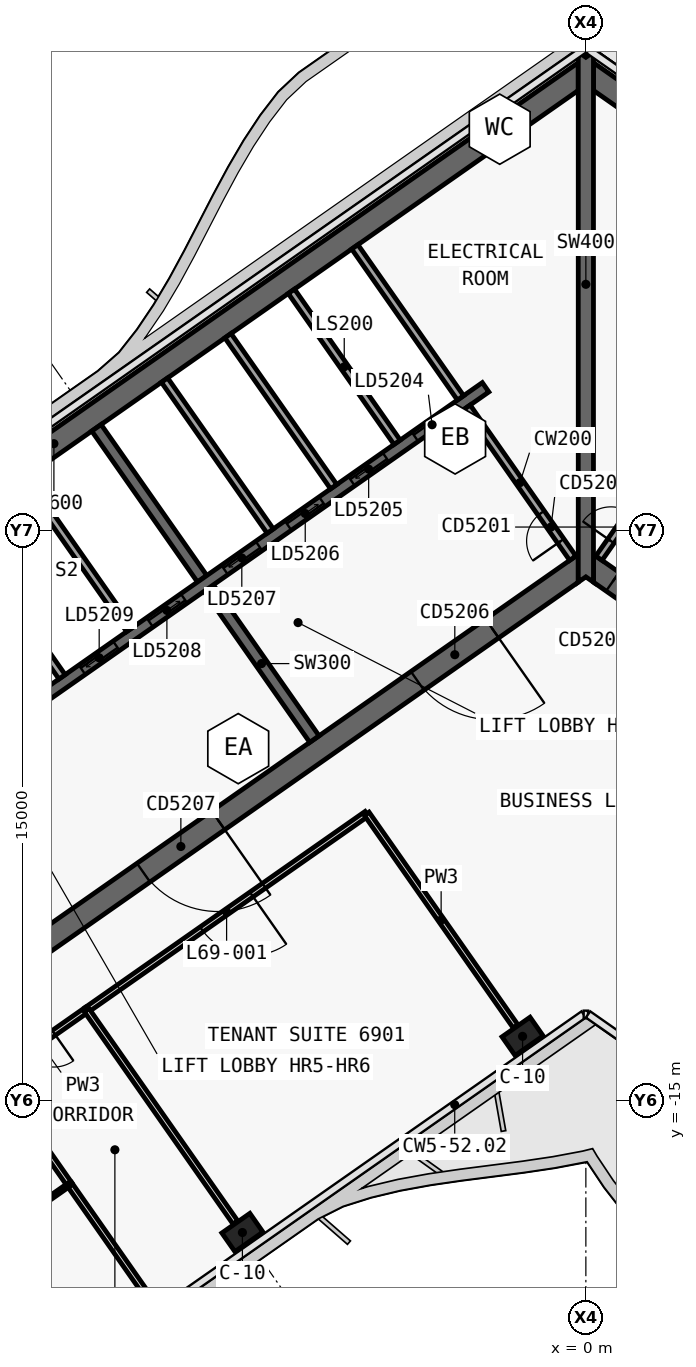
"""IFC4 building model, lengths in metres.
Left out: names, types, materials, properties, quantities, classifications, styles, units other than length and angle.
Written with IfcOpenShell. Run it as: python <this file> out.ifc"""

import sys

from ifc_helpers import new_model, si_unit, direction, frame, frame_2d, origin, origin_2d, place, context, subcontext, project, spatial, polyline, rectangle, outline, extrude, element, fill, save


model = new_model("IFC4")
c1 = context("Model", 3, precision=1e-05, world=origin(), true_north=direction((0.0, 1.0)))
c2 = subcontext(c1, "Body", "Model", "MODEL_VIEW")
j1 = project(units=[si_unit("LENGTHUNIT", "METRE"), si_unit("PLANEANGLEUNIT", "RADIAN")], contexts=[c1])
p1 = place(None, origin())
s1 = spatial("IfcSite", under=j1, at=p1, CompositionType="ELEMENT")
p2 = place(p1, origin())
s2 = spatial("IfcBuilding", under=s1, at=p2, CompositionType="ELEMENT")
p3 = place(p2, frame((0.0, 0.0, 291.7)))
s3 = spatial("IfcBuildingStorey", under=s2, at=p3, CompositionType="ELEMENT", Elevation=291.7)
p4 = place(p3, frame((-0.028, 12.066, 0.0), z_axis=(0.0, 0.0, 1.0), x_axis=(-0.819151382952, -0.573577380837, 0.0)))
e1 = element("IfcWall", 1, at=p4, inside=s3, PredefinedType="SHEAR", context=c2, shape_type="SweptSolid", body=[
    extrude(outline(polyline([(33.898, 0.3), (0.42, 0.3), (0.0, -0.3), (33.898, -0.3), (33.898, 0.3)])), origin(), (0.0, 0.0, 1.0), 3.9),
])
p5 = place(p3, frame((-0.028, -0.874, 0.0), z_axis=(0.0, 0.0, 1.0), x_axis=(-0.819150035022, -0.573579305871, 0.0)))
e2 = element("IfcWall", 2, at=p5, inside=s3, PredefinedType="SHEAR", context=c2, shape_type="SweptSolid", body=[
    extrude(outline(polyline([(26.476, 0.3), (0.42, 0.3), (0.0, -0.3), (26.476, -0.3), (26.476, 0.3)])), origin(), (0.0, 0.0, 1.0), 3.9),
])
p6 = place(p5, frame((2.976, 0.0, 0.0)))
e3 = element("IfcOpeningElement", 3, at=p6, cuts=e2, PredefinedType="OPENING", context=c2, shape_type="SweptSolid", body=[
    extrude(rectangle(XDim=2.4, YDim=2.1, at=frame_2d((1.2, 1.05))), frame((0.0, 0.31, 0.0), z_axis=(0.0, -1.0, 0.0), x_axis=(1.0, 0.0, 0.0)), (0.0, 0.0, 1.0), 0.62),
])
p7 = place(p5, frame((11.776, 0.0, 0.0)))
e4 = element("IfcOpeningElement", 4, at=p7, cuts=e2, PredefinedType="OPENING", context=c2, shape_type="SweptSolid", body=[
    extrude(rectangle(XDim=2.4, YDim=2.1, at=frame_2d((1.2, 1.05))), frame((0.0, 0.31, 0.0), z_axis=(0.0, -1.0, 0.0), x_axis=(1.0, 0.0, 0.0)), (0.0, 0.0, 1.0), 0.62),
])
p8 = place(p3, frame((-7.143, -5.49, 0.0), z_axis=(0.0, 0.0, 1.0), x_axis=(-0.573617744349, 0.819123118565, 0.0)))
e5 = element("IfcWall", 5, at=p8, inside=s3, PredefinedType="SHEAR", context=c2, shape_type="SweptSolid", body=[
    extrude(outline(polyline([(4.85, 0.15), (0.0, 0.15), (0.0, -0.15), (4.85, -0.15), (4.85, 0.15)])), origin(), (0.0, 0.0, 1.0), 3.9),
])
p9 = place(p3, frame((-10.097, -1.271, 0.0), z_axis=(0.0, 0.0, 1.0), x_axis=(-0.573560315113, 0.819163332265, 0.0)))
e6 = element("IfcWall", 6, at=p9, inside=s3, PredefinedType="SHEAR", context=c2, shape_type="SweptSolid", body=[
    extrude(outline(polyline([(4.85, -0.15), (4.85, 0.15), (0.0, 0.15), (0.0, -0.15), (4.85, -0.15)])), origin(), (0.0, 0.0, 1.0), 3.9),
])
p10 = place(p3, frame((-2.638, 3.768, 0.0), z_axis=(0.0, 0.0, 1.0), x_axis=(-0.819155014212, -0.573572194837, 0.0)))
e7 = element("IfcWall", 7, at=p10, inside=s3, PredefinedType="SHEAR", context=c2, shape_type="SweptSolid", body=[
    extrude(outline(polyline([(26.4, 0.15), (0.0, 0.15), (0.0, -0.15), (26.4, -0.15), (26.4, 0.15)])), origin(), (0.0, 0.0, 1.0), 3.9),
])
p11 = place(p10, frame((1.169, 0.0, 0.0)))
e8 = element("IfcOpeningElement", 8, at=p11, cuts=e7, PredefinedType="OPENING", context=c2, shape_type="SweptSolid", body=[
    extrude(rectangle(XDim=1.1, YDim=2.1, at=frame_2d((0.55, 1.05))), frame((0.0, 0.16, 0.0), z_axis=(0.0, -1.0, 0.0), x_axis=(1.0, 0.0, 0.0)), (0.0, 0.0, 1.0), 0.32),
])
p12 = place(p10, frame((3.206, 0.0, 0.0)))
e9 = element("IfcOpeningElement", 9, at=p12, cuts=e7, PredefinedType="OPENING", context=c2, shape_type="SweptSolid", body=[
    extrude(rectangle(XDim=1.1, YDim=2.1, at=frame_2d((0.55, 1.05))), frame((0.0, 0.16, 0.0), z_axis=(0.0, -1.0, 0.0), x_axis=(1.0, 0.0, 0.0)), (0.0, 0.0, 1.0), 0.32),
])
p13 = place(p10, frame((5.244, 0.0, 0.0)))
e10 = element("IfcOpeningElement", 10, at=p13, cuts=e7, PredefinedType="OPENING", context=c2, shape_type="SweptSolid", body=[
    extrude(rectangle(XDim=1.1, YDim=2.1, at=frame_2d((0.55, 1.05))), frame((0.0, 0.16, 0.0), z_axis=(0.0, -1.0, 0.0), x_axis=(1.0, 0.0, 0.0)), (0.0, 0.0, 1.0), 0.32),
])
p14 = place(p10, frame((7.281, 0.0, 0.0)))
e11 = element("IfcOpeningElement", 11, at=p14, cuts=e7, PredefinedType="OPENING", context=c2, shape_type="SweptSolid", body=[
    extrude(rectangle(XDim=1.1, YDim=2.1, at=frame_2d((0.55, 1.05))), frame((0.0, 0.16, 0.0), z_axis=(0.0, -1.0, 0.0), x_axis=(1.0, 0.0, 0.0)), (0.0, 0.0, 1.0), 0.32),
])
p15 = place(p10, frame((9.688, 0.0, 0.0)))
e12 = element("IfcOpeningElement", 12, at=p15, cuts=e7, PredefinedType="OPENING", context=c2, shape_type="SweptSolid", body=[
    extrude(rectangle(XDim=1.1, YDim=2.1, at=frame_2d((0.55, 1.05))), frame((0.0, 0.16, 0.0), z_axis=(0.0, -1.0, 0.0), x_axis=(1.0, 0.0, 0.0)), (0.0, 0.0, 1.0), 0.32),
])
p16 = place(p10, frame((11.863, 0.0, 0.0)))
e13 = element("IfcOpeningElement", 13, at=p16, cuts=e7, PredefinedType="OPENING", context=c2, shape_type="SweptSolid", body=[
    extrude(rectangle(XDim=1.1, YDim=2.1, at=frame_2d((0.55, 1.05))), frame((0.0, 0.16, 0.0), z_axis=(0.0, -1.0, 0.0), x_axis=(1.0, 0.0, 0.0)), (0.0, 0.0, 1.0), 0.32),
])
p17 = place(p10, frame((15.175, 0.0, 0.0)))
e14 = element("IfcOpeningElement", 14, at=p17, cuts=e7, PredefinedType="OPENING", context=c2, shape_type="SweptSolid", body=[
    extrude(rectangle(XDim=1.0, YDim=2.1, at=frame_2d((0.5, 1.05))), frame((0.0, 0.16, 0.0), z_axis=(0.0, -1.0, 0.0), x_axis=(1.0, 0.0, 0.0)), (0.0, 0.0, 1.0), 0.32),
])
p18 = place(p3, frame((0.028, 12.066, 0.0), z_axis=(0.0, 0.0, 1.0), x_axis=(0.819151382952, -0.573577380837, 0.0)))
e15 = element("IfcWall", 15, at=p18, inside=s3, PredefinedType="SHEAR", context=c2, shape_type="SweptSolid", body=[
    extrude(outline(polyline([(33.898, 0.3), (0.0, 0.3), (0.42, -0.3), (33.898, -0.3), (33.898, 0.3)])), origin(), (0.0, 0.0, 1.0), 3.9),
])
p19 = place(p3, frame((0.028, -0.874, 0.0), z_axis=(0.0, 0.0, 1.0), x_axis=(0.819150035022, -0.573579305871, 0.0)))
e16 = element("IfcWall", 16, at=p19, inside=s3, PredefinedType="SHEAR", context=c2, shape_type="SweptSolid", body=[
    extrude(outline(polyline([(26.476, 0.3), (0.0, 0.3), (0.42, -0.3), (26.476, -0.3), (26.476, 0.3)])), origin(), (0.0, 0.0, 1.0), 3.9),
])
p20 = place(p19, frame((0.826, 0.0, 0.0)))
e17 = element("IfcOpeningElement", 17, at=p20, cuts=e16, PredefinedType="OPENING", context=c2, shape_type="SweptSolid", body=[
    extrude(rectangle(XDim=1.5, YDim=2.1, at=frame_2d((0.75, 1.05))), frame((0.0, 0.31, 0.0), z_axis=(0.0, -1.0, 0.0), x_axis=(1.0, 0.0, 0.0)), (0.0, 0.0, 1.0), 0.62),
])
p21 = place(p19, frame((12.226, 0.0, 0.0)))
e18 = element("IfcOpeningElement", 18, at=p21, cuts=e16, PredefinedType="OPENING", context=c2, shape_type="SweptSolid", body=[
    extrude(rectangle(XDim=1.5, YDim=2.1, at=frame_2d((0.75, 1.05))), frame((0.0, 0.31, 0.0), z_axis=(0.0, -1.0, 0.0), x_axis=(1.0, 0.0, 0.0)), (0.0, 0.0, 1.0), 0.62),
])
p22 = place(p3, frame((0.0, -1.361, 0.0), z_axis=(0.0, 0.0, 1.0), x_axis=(0.0, 1.0, 0.0)))
e19 = element("IfcWall", 19, at=p22, inside=s3, PredefinedType="SHEAR", context=c2, shape_type="SweptSolid", body=[
    extrude(outline(polyline([(0.14, 0.2), (0.0, 0.2), (0.14, 0.0), (0.0, -0.2), (0.14, -0.2), (1.012, -0.2), (12.94, -0.2), (13.813, -0.2), (13.893, -0.2), (13.933, -0.172), (13.813, 0.0), (13.933, 0.172), (13.893, 0.2), (13.813, 0.2), (12.94, 0.2), (1.012, 0.2), (0.14, 0.2)])), origin(), (0.0, 0.0, 1.0), 3.9),
])
for number, where, z_axis, x_axis in (
    (20, (-1.665, -13.313, 0.0), (0.0, 0.0, 1.0), (-0.819, -0.574, 0.0)),
    (21, (-9.038, -18.475, 0.0), (0.0, 0.0, 1.0), (-0.819, -0.574, 0.0)),
):
    element("IfcColumn", number, at=place(p3, frame(where, z_axis=z_axis, x_axis=x_axis)), inside=s3, PredefinedType="COLUMN", context=c2, shape_type="SweptSolid", body=[
        extrude(rectangle(XDim=0.9, YDim=0.6, at=origin_2d()), origin(), (0.0, 0.0, 1.0), 3.9),
    ])
p23 = place(p3, frame((-4.967, 2.321, 0.0), z_axis=(0.0, 0.0, 1.0), x_axis=(-0.573594092424, 0.81913968109, 0.0)))
e22 = element("IfcWall", 22, at=p23, inside=s3, PredefinedType="SOLIDWALL", context=c2, shape_type="SweptSolid", body=[
    extrude(rectangle(XDim=4.85, YDim=0.2, at=frame_2d((2.425, 0.0))), origin(), (0.0, 0.0, 1.0), 3.9),
])
p24 = place(p3, frame((-6.636, 1.152, 0.0), z_axis=(0.0, 0.0, 1.0), x_axis=(-0.573560315113, 0.819163332265, 0.0)))
e23 = element("IfcWall", 23, at=p24, inside=s3, PredefinedType="SOLIDWALL", context=c2, shape_type="SweptSolid", body=[
    extrude(rectangle(XDim=4.85, YDim=0.2, at=frame_2d((2.425, 0.0))), origin(), (0.0, 0.0, 1.0), 3.9),
])
p25 = place(p3, frame((-8.305, -0.017, 0.0), z_axis=(0.0, 0.0, 1.0), x_axis=(-0.573594092424, 0.81913968109, 0.0)))
e24 = element("IfcWall", 24, at=p25, inside=s3, PredefinedType="SOLIDWALL", context=c2, shape_type="SweptSolid", body=[
    extrude(rectangle(XDim=4.85, YDim=0.2, at=frame_2d((2.425, 0.0))), origin(), (0.0, 0.0, 1.0), 3.9),
])
p26 = place(p3, frame((-12.001, -2.605, 0.0), z_axis=(0.0, 0.0, 1.0), x_axis=(-0.573560315113, 0.819163332265, 0.0)))
e25 = element("IfcWall", 25, at=p26, inside=s3, PredefinedType="SOLIDWALL", context=c2, shape_type="SweptSolid", body=[
    extrude(rectangle(XDim=4.85, YDim=0.2, at=frame_2d((2.425, 0.0))), origin(), (0.0, 0.0, 1.0), 3.9),
])
p27 = place(p3, frame((-13.783, -3.852, 0.0), z_axis=(0.0, 0.0, 1.0), x_axis=(-0.573594092424, 0.81913968109, 0.0)))
e26 = element("IfcWall", 26, at=p27, inside=s3, PredefinedType="SOLIDWALL", context=c2, shape_type="SweptSolid", body=[
    extrude(rectangle(XDim=4.85, YDim=0.2, at=frame_2d((2.425, 0.0))), origin(), (0.0, 0.0, 1.0), 3.9),
])
p28 = place(p3, frame((-0.344, -0.729, 0.0), z_axis=(0.0, 0.0, 1.0), x_axis=(-0.573560315113, 0.819163332265, 0.0)))
e27 = element("IfcWall", 27, at=p28, inside=s3, PredefinedType="SOLIDWALL", context=c2, shape_type="SweptSolid", body=[
    extrude(rectangle(XDim=4.85, YDim=0.2, at=frame_2d((2.425, 0.0))), origin(), (0.0, 0.0, 1.0), 3.62),
])
p29 = place(p28, frame((0.55, 0.0, 0.0)))
e28 = element("IfcOpeningElement", 28, at=p29, cuts=e27, PredefinedType="OPENING", context=c2, shape_type="SweptSolid", body=[
    extrude(rectangle(XDim=0.9, YDim=2.1, at=frame_2d((0.45, 1.05))), frame((0.0, 0.11, 0.0), z_axis=(0.0, -1.0, 0.0), x_axis=(1.0, 0.0, 0.0)), (0.0, 0.0, 1.0), 0.22),
])
p30 = place(p3, frame((-3.298, 3.49, 0.0), z_axis=(0.0, 0.0, 1.0), x_axis=(-0.573560315113, 0.819163332265, 0.0)))
e29 = element("IfcWall", 29, at=p30, inside=s3, PredefinedType="SOLIDWALL", context=c2, shape_type="SweptSolid", body=[
    extrude(rectangle(XDim=4.85, YDim=0.2, at=frame_2d((2.425, 0.0))), origin(), (0.0, 0.0, 1.0), 3.62),
])
p31 = place(p3, frame((0.344, -0.729, 0.0), z_axis=(0.0, 0.0, 1.0), x_axis=(0.573560315113, 0.819163332265, 0.0)))
e30 = element("IfcWall", 30, at=p31, inside=s3, PredefinedType="SOLIDWALL", context=c2, shape_type="SweptSolid", body=[
    extrude(rectangle(XDim=4.85, YDim=0.2, at=frame_2d((2.425, 0.0))), origin(), (0.0, 0.0, 1.0), 3.62),
])
p32 = place(p31, frame((0.55, 0.0, 0.0)))
e31 = element("IfcOpeningElement", 31, at=p32, cuts=e30, PredefinedType="OPENING", context=c2, shape_type="SweptSolid", body=[
    extrude(rectangle(XDim=0.9, YDim=2.1, at=frame_2d((0.45, 1.05))), frame((0.0, 0.11, 0.0), z_axis=(0.0, -1.0, 0.0), x_axis=(1.0, 0.0, 0.0)), (0.0, 0.0, 1.0), 0.22),
])
p33 = place(p3, frame((-5.766, -7.456, 0.0), z_axis=(0.0, 0.0, 1.0), x_axis=(-0.81915291695, -0.57357519006, 0.0)))
e32 = element("IfcWall", 32, at=p33, inside=s3, PredefinedType="PARTITIONING", context=c2, shape_type="SweptSolid", body=[
    extrude(rectangle(XDim=9.002, YDim=0.15, at=frame_2d((4.501, 0.0))), origin(), (0.0, 0.0, 1.0), 3.05),
])
p34 = place(p33, frame((3.701, 0.0, 0.0)))
e33 = element("IfcOpeningElement", 33, at=p34, cuts=e32, PredefinedType="OPENING", context=c2, shape_type="SweptSolid", body=[
    extrude(rectangle(XDim=1.6, YDim=2.1, at=frame_2d((0.8, 1.05))), frame((0.0, 0.085, 0.0), z_axis=(0.0, -1.0, 0.0), x_axis=(1.0, 0.0, 0.0)), (0.0, 0.0, 1.0), 0.17),
])
p35 = place(p3, frame((-13.137, -12.617, 0.0), z_axis=(0.0, 0.0, 1.0), x_axis=(-0.81916700466, -0.573555070134, 0.0)))
e34 = element("IfcWall", 34, at=p35, inside=s3, PredefinedType="PARTITIONING", context=c2, shape_type="SweptSolid", body=[
    extrude(rectangle(XDim=3.004, YDim=0.15, at=frame_2d((1.502, 0.0))), origin(), (0.0, 0.0, 1.0), 3.05),
])
p36 = place(p35, frame((1.052, 0.0, 0.0)))
e35 = element("IfcOpeningElement", 35, at=p36, cuts=e34, PredefinedType="OPENING", context=c2, shape_type="SweptSolid", body=[
    extrude(rectangle(XDim=0.9, YDim=2.1, at=frame_2d((0.45, 1.05))), frame((0.0, 0.085, 0.0), z_axis=(0.0, -1.0, 0.0), x_axis=(1.0, 0.0, 0.0)), (0.0, 0.0, 1.0), 0.17),
])
p37 = place(p3, frame((-1.849, -13.051, 0.0), z_axis=(0.0, 0.0, 1.0), x_axis=(-0.57357985571, 0.819149650018, 0.0)))
e36 = element("IfcWall", 36, at=p37, inside=s3, PredefinedType="PARTITIONING", context=c2, shape_type="SweptSolid", body=[
    extrude(rectangle(XDim=6.832, YDim=0.15, at=frame_2d((3.416, 0.0))), origin(), (0.0, 0.0, 1.0), 3.05),
])
p38 = place(p3, frame((-9.221, -18.213, 0.0), z_axis=(0.0, 0.0, 1.0), x_axis=(-0.573560698343, 0.819163063936, 0.0)))
e37 = element("IfcWall", 37, at=p38, inside=s3, PredefinedType="PARTITIONING", context=c2, shape_type="SweptSolid", body=[
    extrude(rectangle(XDim=6.83, YDim=0.15, at=frame_2d((3.415, 0.0))), origin(), (0.0, 0.0, 1.0), 3.05),
])
p39 = place(p3, frame((-11.294, -20.482, 0.0), z_axis=(0.0, 0.0, 1.0), x_axis=(-0.573523771938, 0.819188917785, 0.0)))
e38 = element("IfcWall", 38, at=p39, inside=s3, PredefinedType="PARTITIONING", context=c2, shape_type="SweptSolid", body=[
    extrude(rectangle(XDim=4.001, YDim=0.15, at=frame_2d((2.0, 0.0))), origin(), (0.0, 0.0, 1.0), 3.0),
])
p40 = place(p3, frame((-13.587, -17.208, 0.0), z_axis=(0.0, 0.0, 1.0), x_axis=(-0.573569944718, 0.819156589741, 0.0)))
e39 = element("IfcWall", 39, at=p40, inside=s3, PredefinedType="PARTITIONING", context=c2, shape_type="SweptSolid", body=[
    extrude(rectangle(XDim=3.502, YDim=0.15, at=frame_2d((1.751, 0.0))), origin(), (0.0, 0.0, 1.0), 3.62),
])
p41 = place(p3, frame((-13.588, -17.207, 0.0), z_axis=(0.0, 0.0, 1.0), x_axis=(-0.81915238829, -0.573575945067, 0.0)))
e40 = element("IfcWall", 40, at=p41, inside=s3, PredefinedType="PARTITIONING", context=c2, shape_type="SweptSolid", body=[
    extrude(rectangle(XDim=7.5, YDim=0.1, at=frame_2d((3.75, 0.0))), origin(), (0.0, 0.0, 1.0), 3.05),
])
p42 = place(p41, frame((3.3, 0.0, 0.0)))
e41 = element("IfcOpeningElement", 41, at=p42, cuts=e40, PredefinedType="OPENING", context=c2, shape_type="SweptSolid", body=[
    extrude(rectangle(XDim=0.9, YDim=2.1, at=frame_2d((0.45, 1.05))), frame((0.0, 0.06, 0.0), z_axis=(0.0, -1.0, 0.0), x_axis=(1.0, 0.0, 0.0)), (0.0, 0.0, 1.0), 0.12),
])
p43 = place(p11, origin())
e42 = element("IfcDoor", 42, at=p43, inside=s3, OperationType="SLIDING_TO_LEFT", PredefinedType="DOOR", context=c2, shape_type="SweptSolid", body=[
    extrude(rectangle(XDim=1.1, YDim=2.1, at=frame_2d((0.55, 1.05))), frame((0.0, 0.025, 0.0), z_axis=(0.0, -1.0, 0.0), x_axis=(1.0, 0.0, 0.0)), (0.0, 0.0, 1.0), 0.05),
])
fill(e8, e42)
p44 = place(p12, origin())
e43 = element("IfcDoor", 43, at=p44, inside=s3, OperationType="SLIDING_TO_RIGHT", PredefinedType="DOOR", context=c2, shape_type="SweptSolid", body=[
    extrude(rectangle(XDim=1.1, YDim=2.1, at=frame_2d((0.55, 1.05))), frame((0.0, 0.025, 0.0), z_axis=(0.0, -1.0, 0.0), x_axis=(1.0, 0.0, 0.0)), (0.0, 0.0, 1.0), 0.05),
])
fill(e9, e43)
p45 = place(p13, origin())
e44 = element("IfcDoor", 44, at=p45, inside=s3, OperationType="SLIDING_TO_LEFT", PredefinedType="DOOR", context=c2, shape_type="SweptSolid", body=[
    extrude(rectangle(XDim=1.1, YDim=2.1, at=frame_2d((0.55, 1.05))), frame((0.0, 0.025, 0.0), z_axis=(0.0, -1.0, 0.0), x_axis=(1.0, 0.0, 0.0)), (0.0, 0.0, 1.0), 0.05),
])
fill(e10, e44)
p46 = place(p14, origin())
e45 = element("IfcDoor", 45, at=p46, inside=s3, OperationType="SLIDING_TO_RIGHT", PredefinedType="DOOR", context=c2, shape_type="SweptSolid", body=[
    extrude(rectangle(XDim=1.1, YDim=2.1, at=frame_2d((0.55, 1.05))), frame((0.0, 0.025, 0.0), z_axis=(0.0, -1.0, 0.0), x_axis=(1.0, 0.0, 0.0)), (0.0, 0.0, 1.0), 0.05),
])
fill(e11, e45)
p47 = place(p15, origin())
e46 = element("IfcDoor", 46, at=p47, inside=s3, OperationType="SLIDING_TO_LEFT", PredefinedType="DOOR", context=c2, shape_type="SweptSolid", body=[
    extrude(rectangle(XDim=1.1, YDim=2.1, at=frame_2d((0.55, 1.05))), frame((0.0, 0.025, 0.0), z_axis=(0.0, -1.0, 0.0), x_axis=(1.0, 0.0, 0.0)), (0.0, 0.0, 1.0), 0.05),
])
fill(e12, e46)
p48 = place(p16, origin())
e47 = element("IfcDoor", 47, at=p48, inside=s3, OperationType="SLIDING_TO_RIGHT", PredefinedType="DOOR", context=c2, shape_type="SweptSolid", body=[
    extrude(rectangle(XDim=1.1, YDim=2.1, at=frame_2d((0.55, 1.05))), frame((0.0, 0.025, 0.0), z_axis=(0.0, -1.0, 0.0), x_axis=(1.0, 0.0, 0.0)), (0.0, 0.0, 1.0), 0.05),
])
fill(e13, e47)
p49 = place(p6, origin())
e48 = element("IfcDoor", 48, at=p49, inside=s3, OperationType="DOUBLE_DOOR_SINGLE_SWING", PredefinedType="DOOR", context=c2, shape_type="SweptSolid", body=[
    extrude(rectangle(XDim=2.4, YDim=2.1, at=frame_2d((1.2, 1.05))), frame((0.0, 0.025, 0.0), z_axis=(0.0, -1.0, 0.0), x_axis=(1.0, 0.0, 0.0)), (0.0, 0.0, 1.0), 0.05),
])
fill(e3, e48)
p50 = place(p7, origin())
e49 = element("IfcDoor", 49, at=p50, inside=s3, OperationType="DOUBLE_DOOR_SINGLE_SWING", PredefinedType="DOOR", context=c2, shape_type="SweptSolid", body=[
    extrude(rectangle(XDim=2.4, YDim=2.1, at=frame_2d((1.2, 1.05))), frame((0.0, 0.025, 0.0), z_axis=(0.0, -1.0, 0.0), x_axis=(1.0, 0.0, 0.0)), (0.0, 0.0, 1.0), 0.05),
])
fill(e4, e49)
p51 = place(p20, origin())
e50 = element("IfcDoor", 50, at=p51, inside=s3, OperationType="SINGLE_SWING_RIGHT", PredefinedType="DOOR", context=c2, shape_type="SweptSolid", body=[
    extrude(rectangle(XDim=1.5, YDim=2.1, at=frame_2d((0.75, 1.05))), frame((0.0, 0.025, 0.0), z_axis=(0.0, -1.0, 0.0), x_axis=(1.0, 0.0, 0.0)), (0.0, 0.0, 1.0), 0.05),
])
fill(e17, e50)
p52 = place(p29, origin())
e51 = element("IfcDoor", 51, at=p52, inside=s3, OperationType="SINGLE_SWING_RIGHT", PredefinedType="DOOR", context=c2, shape_type="SweptSolid", body=[
    extrude(rectangle(XDim=0.9, YDim=2.1, at=frame_2d((0.45, 1.05))), frame((0.0, 0.025, 0.0), z_axis=(0.0, -1.0, 0.0), x_axis=(1.0, 0.0, 0.0)), (0.0, 0.0, 1.0), 0.05),
])
fill(e28, e51)
p53 = place(p32, origin())
e52 = element("IfcDoor", 52, at=p53, inside=s3, OperationType="SINGLE_SWING_RIGHT", PredefinedType="DOOR", context=c2, shape_type="SweptSolid", body=[
    extrude(rectangle(XDim=0.9, YDim=2.1, at=frame_2d((0.45, 1.05))), frame((0.0, 0.025, 0.0), z_axis=(0.0, -1.0, 0.0), x_axis=(1.0, 0.0, 0.0)), (0.0, 0.0, 1.0), 0.05),
])
fill(e31, e52)
p54 = place(p34, origin())
e53 = element("IfcDoor", 53, at=p54, inside=s3, OperationType="DOUBLE_DOOR_SINGLE_SWING", PredefinedType="DOOR", context=c2, shape_type="SweptSolid", body=[
    extrude(rectangle(XDim=1.6, YDim=2.1, at=frame_2d((0.8, 1.05))), frame((0.0, 0.025, 0.0), z_axis=(0.0, -1.0, 0.0), x_axis=(1.0, 0.0, 0.0)), (0.0, 0.0, 1.0), 0.05),
])
fill(e33, e53)
p55 = place(p36, origin())
e54 = element("IfcDoor", 54, at=p55, inside=s3, OperationType="SINGLE_SWING_LEFT", PredefinedType="DOOR", context=c2, shape_type="SweptSolid", body=[
    extrude(rectangle(XDim=0.9, YDim=2.1, at=frame_2d((0.45, 1.05))), frame((0.0, 0.025, 0.0), z_axis=(0.0, -1.0, 0.0), x_axis=(1.0, 0.0, 0.0)), (0.0, 0.0, 1.0), 0.05),
])
fill(e35, e54)
save(model, sys.argv[1])
